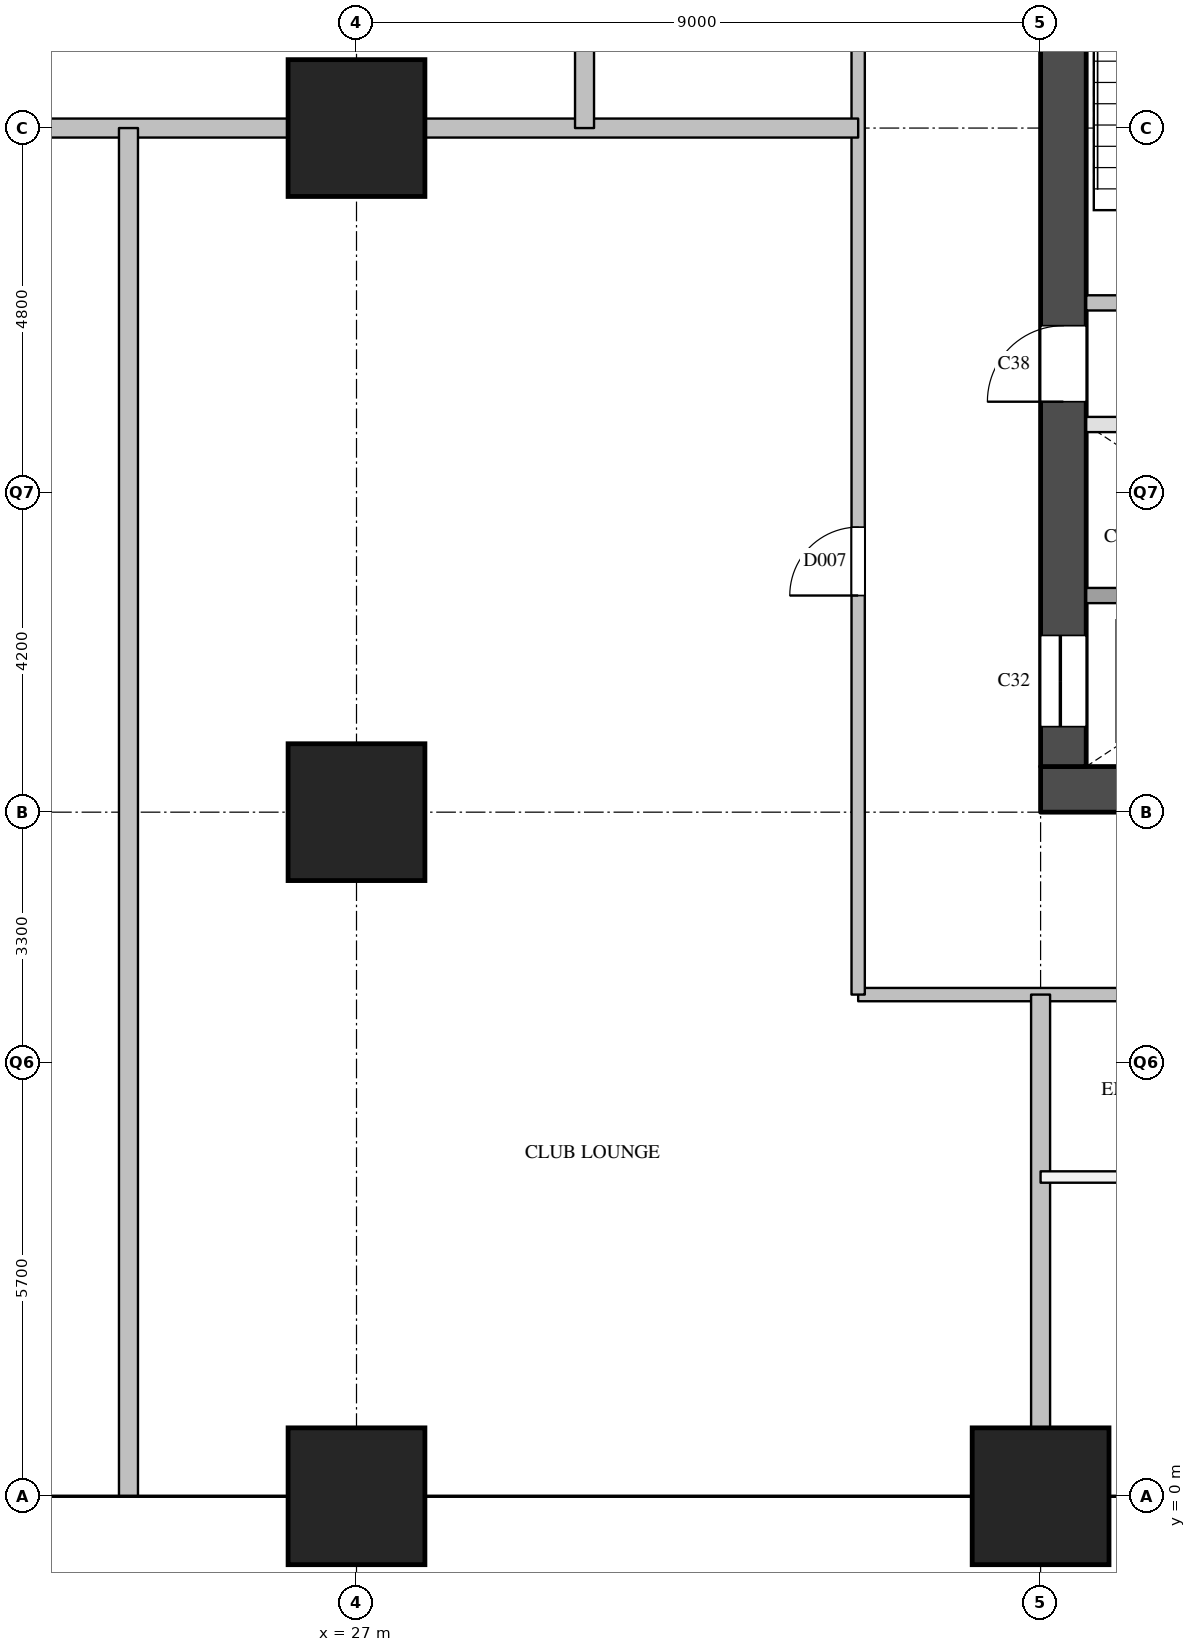
"""IFC4 building model, lengths in metres.
Left out: names, types, materials, properties, quantities, classifications, styles, units other than length and angle.
Written with IfcOpenShell. Run it as: python <this file> out.ifc"""

import sys

from ifc_helpers import new_model, si_unit, direction, frame, frame_2d, origin, origin_2d, place, context, subcontext, project, spatial, rectangle, extrude, element, fill, save


model = new_model("IFC4")
c1 = context("Model", 3, precision=1e-05, world=origin(), true_north=direction((0.0, 1.0)))
c2 = subcontext(c1, "Body", "Model", "MODEL_VIEW")
j1 = project(units=[si_unit("LENGTHUNIT", "METRE"), si_unit("PLANEANGLEUNIT", "RADIAN")], contexts=[c1])
p1 = place(None, origin())
s1 = spatial("IfcSite", under=j1, at=p1, CompositionType="ELEMENT")
p2 = place(p1, origin())
s2 = spatial("IfcBuilding", under=s1, at=p2, CompositionType="ELEMENT")
p3 = place(p2, frame((0.0, 0.0, 65.2)))
s3 = spatial("IfcBuildingStorey", under=s2, at=p3, CompositionType="ELEMENT", Elevation=65.2)
for number, where, z_axis, x_axis in (
    (1, (27.0, 0.0, 0.0), (0.0, 0.0, 1.0), (1.0, 0.0, 0.0)),
    (2, (27.0, 9.0, 0.0), (0.0, 0.0, 1.0), (1.0, 0.0, 0.0)),
    (3, (27.0, 18.0, 0.0), (0.0, 0.0, 1.0), (1.0, 0.0, 0.0)),
    (4, (36.0, 0.0, 0.0), (0.0, 0.0, 1.0), (1.0, 0.0, 0.0)),
):
    element("IfcColumn", number, at=place(p3, frame(where, z_axis=z_axis, x_axis=x_axis)), inside=s3, PredefinedType="COLUMN", context=c2, shape_type="SweptSolid", body=[
        extrude(rectangle(XDim=1.8, YDim=1.8, at=origin_2d()), origin(), (0.0, 0.0, 1.0), 3.8),
    ])
p4 = place(p3, frame((36.0, 9.3, 0.0), z_axis=(0.0, 0.0, 1.0), x_axis=(1.0, 0.0, 0.0)))
e5 = element("IfcWall", 5, at=p4, inside=s3, PredefinedType="SHEAR", context=c2, shape_type="SweptSolid", body=[
    extrude(rectangle(XDim=9.0, YDim=0.6, at=frame_2d((4.5, 0.0))), origin(), (0.0, 0.0, 1.0), 3.5),
])
p5 = place(p3, frame((36.3, 9.6, 0.0), z_axis=(0.0, 0.0, 1.0), x_axis=(0.0, 1.0, 0.0)))
e6 = element("IfcWall", 6, at=p5, inside=s3, PredefinedType="SHEAR", context=c2, shape_type="SweptSolid", body=[
    extrude(rectangle(XDim=12.3, YDim=0.6, at=frame_2d((6.15, 0.0))), origin(), (0.0, 0.0, 1.0), 3.5),
])
p6 = place(p5, frame((0.525, 0.0, 0.0)))
e7 = element("IfcOpeningElement", 7, at=p6, cuts=e6, PredefinedType="OPENING", context=c2, shape_type="SweptSolid", body=[
    extrude(rectangle(XDim=1.2, YDim=2.1, at=frame_2d((0.6, 1.05))), frame((0.0, 0.31, 0.0), z_axis=(0.0, -1.0, 0.0), x_axis=(1.0, 0.0, 0.0)), (0.0, 0.0, 1.0), 0.62),
])
p7 = place(p5, frame((4.8, 0.0, 0.0)))
e8 = element("IfcOpeningElement", 8, at=p7, cuts=e6, PredefinedType="OPENING", context=c2, shape_type="SweptSolid", body=[
    extrude(rectangle(XDim=1.0, YDim=2.1, at=frame_2d((0.5, 1.05))), frame((0.0, 0.31, 0.0), z_axis=(0.0, -1.0, 0.0), x_axis=(1.0, 0.0, 0.0)), (0.0, 0.0, 1.0), 0.62),
])
p8 = place(p3, frame((36.6, 11.85, 0.0), z_axis=(0.0, 0.0, 1.0), x_axis=(1.0, 0.0, 0.0)))
e9 = element("IfcWall", 9, at=p8, inside=s3, PredefinedType="SOLIDWALL", context=c2, shape_type="SweptSolid", body=[
    extrude(rectangle(XDim=7.8, YDim=0.2, at=frame_2d((3.9, 0.0))), origin(), (0.0, 0.0, 1.0), 3.5),
])
p9 = place(p3, frame((36.6, 14.1, 0.0), z_axis=(0.0, 0.0, 1.0), x_axis=(1.0, 0.0, 0.0)))
e10 = element("IfcWall", 10, at=p9, inside=s3, PredefinedType="PARTITIONING", context=c2, shape_type="SweptSolid", body=[
    extrude(rectangle(XDim=6.0, YDim=0.2, at=frame_2d((3.0, 0.0))), origin(), (0.0, 0.0, 1.0), 3.5),
])
p10 = place(p9, frame((1.05, 0.0, 0.0)))
e11 = element("IfcOpeningElement", 11, at=p10, cuts=e10, PredefinedType="OPENING", context=c2, shape_type="SweptSolid", body=[
    extrude(rectangle(XDim=0.9, YDim=2.1, at=frame_2d((0.45, 1.05))), frame((0.0, 0.11, 0.0), z_axis=(0.0, -1.0, 0.0), x_axis=(1.0, 0.0, 0.0)), (0.0, 0.0, 1.0), 0.22),
])
p11 = place(p9, frame((4.05, 0.0, 0.0)))
e12 = element("IfcOpeningElement", 12, at=p11, cuts=e10, PredefinedType="OPENING", context=c2, shape_type="SweptSolid", body=[
    extrude(rectangle(XDim=0.9, YDim=2.1, at=frame_2d((0.45, 1.05))), frame((0.0, 0.11, 0.0), z_axis=(0.0, -1.0, 0.0), x_axis=(1.0, 0.0, 0.0)), (0.0, 0.0, 1.0), 0.22),
])
p12 = place(p3, frame((36.6, 15.7, 0.0), z_axis=(0.0, 0.0, 1.0), x_axis=(1.0, 0.0, 0.0)))
e13 = element("IfcWall", 13, at=p12, inside=s3, PredefinedType="SOLIDWALL", context=c2, shape_type="SweptSolid", body=[
    extrude(rectangle(XDim=6.3, YDim=0.2, at=frame_2d((3.15, 0.0))), origin(), (0.0, 0.0, 1.0), 3.5),
])
p13 = place(p12, frame((1.025, 0.0, 0.0)))
e14 = element("IfcOpeningElement", 14, at=p13, cuts=e13, PredefinedType="OPENING", context=c2, shape_type="SweptSolid", body=[
    extrude(rectangle(XDim=1.1, YDim=2.1, at=frame_2d((0.55, 1.05))), frame((0.0, 0.11, 0.0), z_axis=(0.0, -1.0, 0.0), x_axis=(1.0, 0.0, 0.0)), (0.0, 0.0, 1.0), 0.22),
])
p14 = place(p12, frame((4.175, 0.0, 0.0)))
e15 = element("IfcOpeningElement", 15, at=p14, cuts=e13, PredefinedType="OPENING", context=c2, shape_type="SweptSolid", body=[
    extrude(rectangle(XDim=1.1, YDim=2.1, at=frame_2d((0.55, 1.05))), frame((0.0, 0.11, 0.0), z_axis=(0.0, -1.0, 0.0), x_axis=(1.0, 0.0, 0.0)), (0.0, 0.0, 1.0), 0.22),
])
p15 = place(p3, frame((33.6, 6.6, 0.0), z_axis=(0.0, 0.0, 1.0), x_axis=(1.0, 0.0, 0.0)))
e16 = element("IfcWall", 16, at=p15, inside=s3, PredefinedType="PARTITIONING", context=c2, shape_type="SweptSolid", body=[
    extrude(rectangle(XDim=13.8, YDim=0.175, at=frame_2d((6.9, 0.0))), origin(), (0.0, 0.0, 1.0), 3.5),
])
p16 = place(p15, frame((3.7, 0.0, 0.0)))
e17 = element("IfcOpeningElement", 17, at=p16, cuts=e16, PredefinedType="OPENING", context=c2, shape_type="SweptSolid", body=[
    extrude(rectangle(XDim=1.0, YDim=2.1, at=frame_2d((0.5, 1.05))), frame((0.0, 0.097, 0.0), z_axis=(0.0, -1.0, 0.0), x_axis=(1.0, 0.0, 0.0)), (0.0, 0.0, 1.0), 0.195),
])
p17 = place(p3, frame((33.6, 6.6, 0.0), z_axis=(0.0, 0.0, 1.0), x_axis=(0.0, 1.0, 0.0)))
e18 = element("IfcWall", 18, at=p17, inside=s3, PredefinedType="PARTITIONING", context=c2, shape_type="SweptSolid", body=[
    extrude(rectangle(XDim=18.3, YDim=0.175, at=frame_2d((9.15, 0.0))), origin(), (0.0, 0.0, 1.0), 3.5),
])
p18 = place(p17, frame((5.25, 0.0, 0.0)))
e19 = element("IfcOpeningElement", 19, at=p18, cuts=e18, PredefinedType="OPENING", context=c2, shape_type="SweptSolid", body=[
    extrude(rectangle(XDim=0.9, YDim=2.1, at=frame_2d((0.45, 1.05))), frame((0.0, 0.097, 0.0), z_axis=(0.0, -1.0, 0.0), x_axis=(1.0, 0.0, 0.0)), (0.0, 0.0, 1.0), 0.195),
])
p19 = place(p17, frame((13.9, 0.0, 0.0)))
e20 = element("IfcOpeningElement", 20, at=p19, cuts=e18, PredefinedType="OPENING", context=c2, shape_type="SweptSolid", body=[
    extrude(rectangle(XDim=1.0, YDim=2.1, at=frame_2d((0.5, 1.05))), frame((0.0, 0.097, 0.0), z_axis=(0.0, -1.0, 0.0), x_axis=(1.0, 0.0, 0.0)), (0.0, 0.0, 1.0), 0.195),
])
p20 = place(p3, frame((36.0, 4.2, 0.0), z_axis=(0.0, 0.0, 1.0), x_axis=(1.0, 0.0, 0.0)))
e21 = element("IfcWall", 21, at=p20, inside=s3, PredefinedType="PARTITIONING", context=c2, shape_type="SweptSolid", body=[
    extrude(rectangle(XDim=3.6, YDim=0.15, at=frame_2d((1.8, 0.0))), origin(), (0.0, 0.0, 1.0), 3.5),
])
p21 = place(p20, frame((1.35, 0.0, 0.0)))
e22 = element("IfcOpeningElement", 22, at=p21, cuts=e21, PredefinedType="OPENING", context=c2, shape_type="SweptSolid", body=[
    extrude(rectangle(XDim=0.9, YDim=2.1, at=frame_2d((0.45, 1.05))), frame((0.0, 0.085, 0.0), z_axis=(0.0, -1.0, 0.0), x_axis=(1.0, 0.0, 0.0)), (0.0, 0.0, 1.0), 0.17),
])
p22 = place(p3, frame((20.4, 18.0, 0.0), z_axis=(0.0, 0.0, 1.0), x_axis=(1.0, 0.0, 0.0)))
e23 = element("IfcWall", 23, at=p22, inside=s3, PredefinedType="PARTITIONING", context=c2, shape_type="SweptSolid", body=[
    extrude(rectangle(XDim=13.2, YDim=0.25, at=frame_2d((6.6, 0.0))), origin(), (0.0, 0.0, 1.0), 3.5),
])
p23 = place(p3, frame((24.0, 0.0, 0.0), z_axis=(0.0, 0.0, 1.0), x_axis=(0.0, 1.0, 0.0)))
e24 = element("IfcWall", 24, at=p23, inside=s3, PredefinedType="PARTITIONING", context=c2, shape_type="SweptSolid", body=[
    extrude(rectangle(XDim=18.0, YDim=0.25, at=frame_2d((9.0, 0.0))), origin(), (0.0, 0.0, 1.0), 2.5),
])
p24 = place(p3, frame((30.0, 18.0, 0.0), z_axis=(0.0, 0.0, 1.0), x_axis=(0.0, 1.0, 0.0)))
e25 = element("IfcWall", 25, at=p24, inside=s3, PredefinedType="PARTITIONING", context=c2, shape_type="SweptSolid", body=[
    extrude(rectangle(XDim=6.0, YDim=0.25, at=frame_2d((3.0, 0.0))), origin(), (0.0, 0.0, 1.0), 3.5),
])
p25 = place(p3, frame((36.0, 0.0, 0.0), z_axis=(0.0, 0.0, 1.0), x_axis=(0.0, 1.0, 0.0)))
e26 = element("IfcWall", 26, at=p25, inside=s3, PredefinedType="PARTITIONING", context=c2, shape_type="SweptSolid", body=[
    extrude(rectangle(XDim=6.6, YDim=0.25, at=frame_2d((3.3, 0.0))), origin(), (0.0, 0.0, 1.0), 3.5),
])
p26 = place(p6, origin())
e27 = element("IfcDoor", 27, at=p26, inside=s3, OperationType="SLIDING_TO_LEFT", PredefinedType="DOOR", context=c2, shape_type="SweptSolid", body=[
    extrude(rectangle(XDim=1.2, YDim=2.1, at=frame_2d((0.6, 1.05))), frame((0.0, 0.025, 0.0), z_axis=(0.0, -1.0, 0.0), x_axis=(1.0, 0.0, 0.0)), (0.0, 0.0, 1.0), 0.05),
])
fill(e7, e27)
p27 = place(p7, origin())
e28 = element("IfcDoor", 28, at=p27, inside=s3, OperationType="SINGLE_SWING_LEFT", PredefinedType="DOOR", context=c2, shape_type="SweptSolid", body=[
    extrude(rectangle(XDim=1.0, YDim=2.1, at=frame_2d((0.5, 1.05))), frame((0.0, 0.025, 0.0), z_axis=(0.0, -1.0, 0.0), x_axis=(1.0, 0.0, 0.0)), (0.0, 0.0, 1.0), 0.05),
])
fill(e8, e28)
p28 = place(p18, origin())
e29 = element("IfcDoor", 29, at=p28, inside=s3, OperationType="SINGLE_SWING_LEFT", PredefinedType="DOOR", context=c2, shape_type="SweptSolid", body=[
    extrude(rectangle(XDim=0.9, YDim=2.1, at=frame_2d((0.45, 1.05))), frame((0.0, 0.025, 0.0), z_axis=(0.0, -1.0, 0.0), x_axis=(1.0, 0.0, 0.0)), (0.0, 0.0, 1.0), 0.05),
])
fill(e19, e29)
save(model, sys.argv[1])
